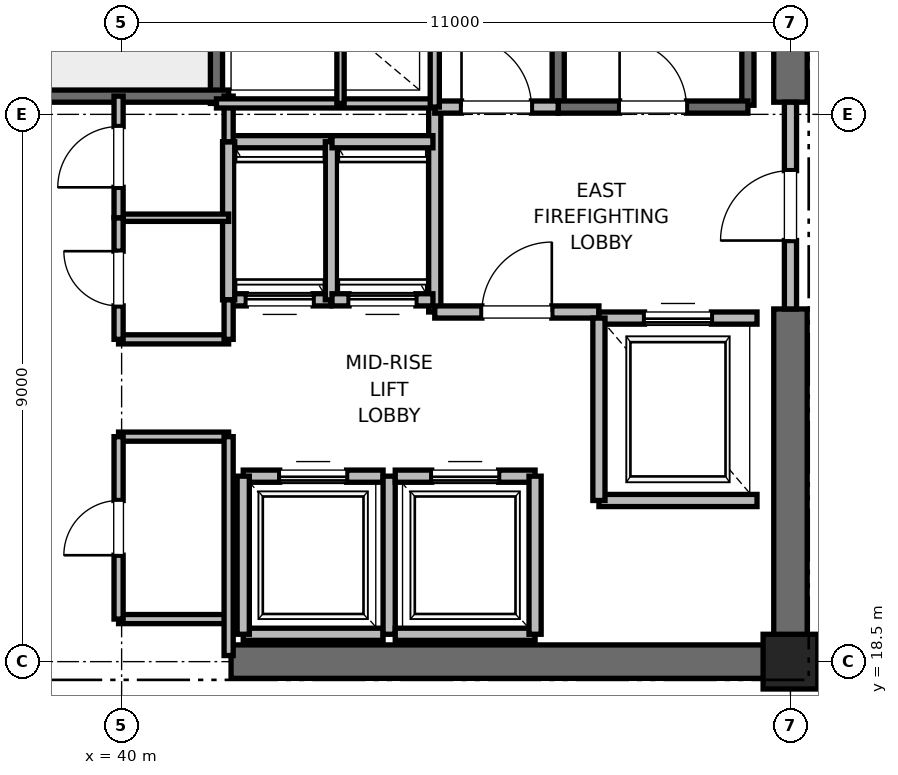
"""IFC4 building model, lengths in metres.
Left out: names, types, materials, properties, quantities, classifications, styles, units other than length and angle.
Written with IfcOpenShell. Run it as: python <this file> out.ifc"""

import sys

from ifc_helpers import new_model, si_unit, direction, frame, frame_2d, origin, origin_2d, place, context, subcontext, project, spatial, rectangle, extrude, element, fill, save


model = new_model("IFC4")
c1 = context("Model", 3, precision=1e-05, world=origin(), true_north=direction((0.0, 1.0)))
c2 = subcontext(c1, "Body", "Model", "MODEL_VIEW")
j1 = project(units=[si_unit("LENGTHUNIT", "METRE"), si_unit("PLANEANGLEUNIT", "RADIAN")], contexts=[c1])
p1 = place(None, origin())
s1 = spatial("IfcSite", under=j1, at=p1, CompositionType="ELEMENT")
p2 = place(p1, origin())
s2 = spatial("IfcBuilding", under=s1, at=p2, CompositionType="ELEMENT")
p3 = place(p2, frame((0.0, 0.0, 209.2)))
s3 = spatial("IfcBuildingStorey", under=s2, at=p3, CompositionType="ELEMENT", Elevation=209.2)
p4 = place(p3, frame((51.0, 18.5, 0.0), z_axis=(0.0, 0.0, 1.0), x_axis=(1.0, 0.0, 0.0)))
e1 = element("IfcColumn", 1, at=p4, inside=s3, PredefinedType="PILASTER", context=c2, shape_type="SweptSolid", body=[
    extrude(rectangle(XDim=0.9, YDim=0.9, at=origin_2d()), origin(), (0.0, 0.0, 1.0), 4.0),
])
p5 = place(p3, frame((41.8, 18.5, 0.0), z_axis=(0.0, 0.0, 1.0), x_axis=(1.0, 0.0, 0.0)))
e2 = element("IfcWall", 2, at=p5, inside=s3, PredefinedType="SHEAR", context=c2, shape_type="SweptSolid", body=[
    extrude(rectangle(XDim=9.2, YDim=0.55, at=frame_2d((4.6, 0.0))), origin(), (0.0, 0.0, 1.0), 3.775),
])
p6 = place(p3, frame((51.0, 18.5, 0.0), z_axis=(0.0, 0.0, 1.0), x_axis=(0.0, 1.0, 0.0)))
e3 = element("IfcWall", 3, at=p6, inside=s3, PredefinedType="SHEAR", context=c2, shape_type="SweptSolid", body=[
    extrude(rectangle(XDim=5.8, YDim=0.55, at=frame_2d((2.9, 0.0))), origin(), (0.0, 0.0, 1.0), 3.775),
])
p7 = place(p3, frame((51.0, 27.7, 0.0), z_axis=(0.0, 0.0, 1.0), x_axis=(0.0, 1.0, 0.0)))
e4 = element("IfcWall", 4, at=p7, inside=s3, PredefinedType="SHEAR", context=c2, shape_type="SweptSolid", body=[
    extrude(rectangle(XDim=8.8, YDim=0.55, at=frame_2d((4.4, 0.0))), origin(), (0.0, 0.0, 1.0), 3.775),
])
p8 = place(p3, frame((50.3, 27.65, 0.0), z_axis=(0.0, 0.0, 1.0), x_axis=(0.0, 1.0, 0.0)))
e5 = element("IfcWall", 5, at=p8, inside=s3, PredefinedType="SOLIDWALL", context=c2, shape_type="SweptSolid", body=[
    extrude(rectangle(XDim=8.15, YDim=0.2, at=frame_2d((4.075, 0.0))), origin(), (0.0, 0.0, 1.0), 3.775),
])
p9 = place(p3, frame((47.18, 27.62, 0.0), z_axis=(0.0, 0.0, 1.0), x_axis=(0.0, 1.0, 0.0)))
e6 = element("IfcWall", 6, at=p9, inside=s3, PredefinedType="SOLIDWALL", context=c2, shape_type="SweptSolid", body=[
    extrude(rectangle(XDim=8.18, YDim=0.2, at=frame_2d((4.09, 0.0))), origin(), (0.0, 0.0, 1.0), 3.775),
])
p10 = place(p3, frame((47.18, 27.62, 0.0), z_axis=(0.0, 0.0, 1.0), x_axis=(1.0, 0.0, 0.0)))
e7 = element("IfcWall", 7, at=p10, inside=s3, PredefinedType="SOLIDWALL", context=c2, shape_type="SweptSolid", body=[
    extrude(rectangle(XDim=3.12, YDim=0.2, at=frame_2d((1.56, 0.0))), origin(), (0.0, 0.0, 1.0), 3.775),
])
p11 = place(p10, frame((1.01, 0.0, 0.0)))
e8 = element("IfcOpeningElement", 8, at=p11, cuts=e7, PredefinedType="OPENING", context=c2, shape_type="SweptSolid", body=[
    extrude(rectangle(XDim=1.1, YDim=2.15, at=frame_2d((0.55, 1.075))), frame((0.0, 0.1, 0.0), z_axis=(0.0, -1.0, 0.0), x_axis=(1.0, 0.0, 0.0)), (0.0, 0.0, 1.0), 0.2),
])
p12 = place(p3, frame((41.56, 27.68, 0.0), z_axis=(0.0, 0.0, 1.0), x_axis=(0.0, 1.0, 0.0)))
e9 = element("IfcWall", 9, at=p12, inside=s3, PredefinedType="SOLIDWALL", context=c2, shape_type="SweptSolid", body=[
    extrude(rectangle(XDim=8.57, YDim=0.2, at=frame_2d((4.285, 0.0))), origin(), (0.0, 0.0, 1.0), 3.775),
])
p13 = place(p3, frame((38.44, 27.8, 0.0), z_axis=(0.0, 0.0, 1.0), x_axis=(1.0, 0.0, 0.0)))
e10 = element("IfcWall", 10, at=p13, inside=s3, PredefinedType="SOLIDWALL", context=c2, shape_type="SweptSolid", body=[
    extrude(rectangle(XDim=3.32, YDim=0.2, at=frame_2d((1.66, 0.0))), origin(), (0.0, 0.0, 1.0), 3.775),
])
p14 = place(p3, frame((45.15, 24.25, 0.0), z_axis=(0.0, 0.0, 1.0), x_axis=(0.0, 1.0, 0.0)))
e11 = element("IfcWall", 11, at=p14, inside=s3, PredefinedType="PARTITIONING", context=c2, shape_type="SweptSolid", body=[
    extrude(rectangle(XDim=3.37, YDim=0.2, at=frame_2d((1.685, 0.0))), origin(), (0.0, 0.0, 1.0), 3.775),
])
p15 = place(p3, frame((45.15, 24.25, 0.0), z_axis=(0.0, 0.0, 1.0), x_axis=(1.0, 0.0, 0.0)))
e12 = element("IfcWall", 12, at=p15, inside=s3, PredefinedType="PARTITIONING", context=c2, shape_type="SweptSolid", body=[
    extrude(rectangle(XDim=2.7, YDim=0.2, at=frame_2d((1.35, 0.0))), origin(), (0.0, 0.0, 1.0), 3.775),
])
p16 = place(p15, frame((0.775, 0.0, 0.0)))
e13 = element("IfcOpeningElement", 13, at=p16, cuts=e12, PredefinedType="OPENING", context=c2, shape_type="SweptSolid", body=[
    extrude(rectangle(XDim=1.15, YDim=2.2, at=frame_2d((0.575, 1.1))), frame((0.0, 0.1, 0.0), z_axis=(0.0, -1.0, 0.0), x_axis=(1.0, 0.0, 0.0)), (0.0, 0.0, 1.0), 0.2),
])
p17 = place(p3, frame((45.15, 27.62, 0.0), z_axis=(0.0, 0.0, 1.0), x_axis=(1.0, 0.0, 0.0)))
e14 = element("IfcWall", 14, at=p17, inside=s3, PredefinedType="PARTITIONING", context=c2, shape_type="SweptSolid", body=[
    extrude(rectangle(XDim=2.03, YDim=0.2, at=frame_2d((1.015, 0.0))), origin(), (0.0, 0.0, 1.0), 3.775),
])
p18 = place(p17, frame((0.44, 0.0, 0.0)))
e15 = element("IfcOpeningElement", 15, at=p18, cuts=e14, PredefinedType="OPENING", context=c2, shape_type="SweptSolid", body=[
    extrude(rectangle(XDim=1.15, YDim=2.2, at=frame_2d((0.575, 1.1))), frame((0.0, 0.1, 0.0), z_axis=(0.0, -1.0, 0.0), x_axis=(1.0, 0.0, 0.0)), (0.0, 0.0, 1.0), 0.2),
])
p19 = place(p3, frame((51.0, 24.3, 0.0), z_axis=(0.0, 0.0, 1.0), x_axis=(0.0, 1.0, 0.0)))
e16 = element("IfcWall", 16, at=p19, inside=s3, PredefinedType="PARTITIONING", context=c2, shape_type="SweptSolid", body=[
    extrude(rectangle(XDim=3.4, YDim=0.2, at=frame_2d((1.7, 0.0))), origin(), (0.0, 0.0, 1.0), 2.755),
])
p20 = place(p19, frame((1.125, 0.0, 0.0)))
e17 = element("IfcOpeningElement", 17, at=p20, cuts=e16, PredefinedType="OPENING", context=c2, shape_type="SweptSolid", body=[
    extrude(rectangle(XDim=1.15, YDim=2.2, at=frame_2d((0.575, 1.1))), frame((0.0, 0.1, 0.0), z_axis=(0.0, -1.0, 0.0), x_axis=(1.0, 0.0, 0.0)), (0.0, 0.0, 1.0), 0.2),
])
p21 = place(p3, frame((47.85, 21.15, 0.0), z_axis=(0.0, 0.0, 1.0), x_axis=(1.0, 0.0, 0.0)))
e18 = element("IfcWall", 18, at=p21, inside=s3, PredefinedType="SOLIDWALL", context=c2, shape_type="SweptSolid", body=[
    extrude(rectangle(XDim=2.6, YDim=0.2, at=frame_2d((1.3, 0.0))), origin(), (0.0, 0.0, 1.0), 3.775),
])
p22 = place(p3, frame((50.45, 24.15, 0.0), z_axis=(0.0, 0.0, 1.0), x_axis=(-1.0, 0.0, 0.0)))
e19 = element("IfcWall", 19, at=p22, inside=s3, PredefinedType="SOLIDWALL", context=c2, shape_type="SweptSolid", body=[
    extrude(rectangle(XDim=2.6, YDim=0.2, at=frame_2d((1.3, 0.0))), origin(), (0.0, 0.0, 1.0), 2.755),
])
p23 = place(p22, frame((0.75, 0.0, 0.0)))
e20 = element("IfcOpeningElement", 20, at=p23, cuts=e19, PredefinedType="OPENING", context=c2, shape_type="SweptSolid", body=[
    extrude(rectangle(XDim=1.1, YDim=2.2, at=frame_2d((0.55, 1.1))), frame((0.0, 0.1, 0.0), z_axis=(0.0, -1.0, 0.0), x_axis=(1.0, 0.0, 0.0)), (0.0, 0.0, 1.0), 0.2),
])
p24 = place(p3, frame((47.85, 24.15, 0.0), z_axis=(0.0, 0.0, 1.0), x_axis=(0.0, -1.0, 0.0)))
e21 = element("IfcWall", 21, at=p24, inside=s3, PredefinedType="SOLIDWALL", context=c2, shape_type="SweptSolid", body=[
    extrude(rectangle(XDim=3.0, YDim=0.2, at=frame_2d((1.5, 0.0))), origin(), (0.0, 0.0, 1.0), 3.775),
])
p25 = place(p3, frame((42.0, 18.95, 0.0), z_axis=(0.0, 0.0, 1.0), x_axis=(1.0, 0.0, 0.0)))
e22 = element("IfcWall", 22, at=p25, inside=s3, PredefinedType="SOLIDWALL", context=c2, shape_type="SweptSolid", body=[
    extrude(rectangle(XDim=2.3, YDim=0.2, at=frame_2d((1.15, 0.0))), origin(), (0.0, 0.0, 1.0), 2.755),
])
p26 = place(p3, frame((44.3, 21.55, 0.0), z_axis=(0.0, 0.0, 1.0), x_axis=(-1.0, 0.0, 0.0)))
e23 = element("IfcWall", 23, at=p26, inside=s3, PredefinedType="SOLIDWALL", context=c2, shape_type="SweptSolid", body=[
    extrude(rectangle(XDim=2.3, YDim=0.2, at=frame_2d((1.15, 0.0))), origin(), (0.0, 0.0, 1.0), 3.775),
])
p27 = place(p26, frame((0.6, 0.0, 0.0)))
e24 = element("IfcOpeningElement", 24, at=p27, cuts=e23, PredefinedType="OPENING", context=c2, shape_type="SweptSolid", body=[
    extrude(rectangle(XDim=1.1, YDim=2.2, at=frame_2d((0.55, 1.1))), frame((0.0, 0.1, 0.0), z_axis=(0.0, -1.0, 0.0), x_axis=(1.0, 0.0, 0.0)), (0.0, 0.0, 1.0), 0.2),
])
p28 = place(p3, frame((42.0, 21.55, 0.0), z_axis=(0.0, 0.0, 1.0), x_axis=(0.0, -1.0, 0.0)))
e25 = element("IfcWall", 25, at=p28, inside=s3, PredefinedType="SOLIDWALL", context=c2, shape_type="SweptSolid", body=[
    extrude(rectangle(XDim=2.6, YDim=0.2, at=frame_2d((1.3, 0.0))), origin(), (0.0, 0.0, 1.0), 2.755),
])
p29 = place(p3, frame((44.4, 18.95, 0.0), z_axis=(0.0, 0.0, 1.0), x_axis=(0.0, 1.0, 0.0)))
e26 = element("IfcWall", 26, at=p29, inside=s3, PredefinedType="SOLIDWALL", context=c2, shape_type="SweptSolid", body=[
    extrude(rectangle(XDim=2.6, YDim=0.2, at=frame_2d((1.3, 0.0))), origin(), (0.0, 0.0, 1.0), 3.775),
])
p30 = place(p3, frame((44.5, 18.95, 0.0), z_axis=(0.0, 0.0, 1.0), x_axis=(1.0, 0.0, 0.0)))
e27 = element("IfcWall", 27, at=p30, inside=s3, PredefinedType="SOLIDWALL", context=c2, shape_type="SweptSolid", body=[
    extrude(rectangle(XDim=2.3, YDim=0.2, at=frame_2d((1.15, 0.0))), origin(), (0.0, 0.0, 1.0), 3.775),
])
p31 = place(p3, frame((46.8, 21.55, 0.0), z_axis=(0.0, 0.0, 1.0), x_axis=(-1.0, 0.0, 0.0)))
e28 = element("IfcWall", 28, at=p31, inside=s3, PredefinedType="SOLIDWALL", context=c2, shape_type="SweptSolid", body=[
    extrude(rectangle(XDim=2.3, YDim=0.2, at=frame_2d((1.15, 0.0))), origin(), (0.0, 0.0, 1.0), 3.775),
])
p32 = place(p31, frame((0.6, 0.0, 0.0)))
e29 = element("IfcOpeningElement", 29, at=p32, cuts=e28, PredefinedType="OPENING", context=c2, shape_type="SweptSolid", body=[
    extrude(rectangle(XDim=1.1, YDim=2.2, at=frame_2d((0.55, 1.1))), frame((0.0, 0.1, 0.0), z_axis=(0.0, -1.0, 0.0), x_axis=(1.0, 0.0, 0.0)), (0.0, 0.0, 1.0), 0.2),
])
p33 = place(p3, frame((46.8, 18.95, 0.0), z_axis=(0.0, 0.0, 1.0), x_axis=(0.0, 1.0, 0.0)))
e30 = element("IfcWall", 30, at=p33, inside=s3, PredefinedType="SOLIDWALL", context=c2, shape_type="SweptSolid", body=[
    extrude(rectangle(XDim=2.6, YDim=0.2, at=frame_2d((1.3, 0.0))), origin(), (0.0, 0.0, 1.0), 3.775),
])
p34 = place(p3, frame((41.76, 24.45, 0.0), z_axis=(0.0, 0.0, 1.0), x_axis=(1.0, 0.0, 0.0)))
e31 = element("IfcWall", 31, at=p34, inside=s3, PredefinedType="SOLIDWALL", context=c2, shape_type="SweptSolid", body=[
    extrude(rectangle(XDim=1.68, YDim=0.2, at=frame_2d((0.84, 0.0))), origin(), (0.0, 0.0, 1.0), 3.775),
])
p35 = place(p34, frame((0.29, 0.0, 0.0)))
e32 = element("IfcOpeningElement", 32, at=p35, cuts=e31, PredefinedType="OPENING", context=c2, shape_type="SweptSolid", body=[
    extrude(rectangle(XDim=1.1, YDim=2.2, at=frame_2d((0.55, 1.1))), frame((0.0, 0.1, 0.0), z_axis=(0.0, -1.0, 0.0), x_axis=(1.0, 0.0, 0.0)), (0.0, 0.0, 1.0), 0.2),
])
p36 = place(p3, frame((43.44, 27.05, 0.0), z_axis=(0.0, 0.0, 1.0), x_axis=(-1.0, 0.0, 0.0)))
e33 = element("IfcWall", 33, at=p36, inside=s3, PredefinedType="SOLIDWALL", context=c2, shape_type="SweptSolid", body=[
    extrude(rectangle(XDim=1.68, YDim=0.2, at=frame_2d((0.84, 0.0))), origin(), (0.0, 0.0, 1.0), 3.775),
])
for number, where, z_axis, x_axis in (
    (34, (41.76, 27.05, 0.0), (0.0, 0.0, 1.0), (0.0, -1.0, 0.0)),
    (35, (43.45, 24.45, 0.0), (0.0, 0.0, 1.0), (0.0, 1.0, 0.0)),
):
    element("IfcWall", number, at=place(p3, frame(where, z_axis=z_axis, x_axis=x_axis)), inside=s3, PredefinedType="SOLIDWALL", context=c2, shape_type="SweptSolid", body=[
        extrude(rectangle(XDim=2.6, YDim=0.2, at=frame_2d((1.3, 0.0))), origin(), (0.0, 0.0, 1.0), 3.775),
    ])
p37 = place(p3, frame((43.46, 24.45, 0.0), z_axis=(0.0, 0.0, 1.0), x_axis=(1.0, 0.0, 0.0)))
e36 = element("IfcWall", 36, at=p37, inside=s3, PredefinedType="SOLIDWALL", context=c2, shape_type="SweptSolid", body=[
    extrude(rectangle(XDim=1.66, YDim=0.2, at=frame_2d((0.83, 0.0))), origin(), (0.0, 0.0, 1.0), 3.775),
])
p38 = place(p37, frame((0.28, 0.0, 0.0)))
e37 = element("IfcOpeningElement", 37, at=p38, cuts=e36, PredefinedType="OPENING", context=c2, shape_type="SweptSolid", body=[
    extrude(rectangle(XDim=1.1, YDim=2.2, at=frame_2d((0.55, 1.1))), frame((0.0, 0.1, 0.0), z_axis=(0.0, -1.0, 0.0), x_axis=(1.0, 0.0, 0.0)), (0.0, 0.0, 1.0), 0.2),
])
p39 = place(p3, frame((45.12, 27.05, 0.0), z_axis=(0.0, 0.0, 1.0), x_axis=(-1.0, 0.0, 0.0)))
e38 = element("IfcWall", 38, at=p39, inside=s3, PredefinedType="SOLIDWALL", context=c2, shape_type="SweptSolid", body=[
    extrude(rectangle(XDim=1.66, YDim=0.2, at=frame_2d((0.83, 0.0))), origin(), (0.0, 0.0, 1.0), 3.775),
])
for number, where, z_axis, x_axis in (
    (39, (39.95, 19.2, 0.0), (0.0, 0.0, 1.0), (1.0, 0.0, 0.0)),
    (40, (39.95, 22.2, 0.0), (0.0, 0.0, 1.0), (1.0, 0.0, 0.0)),
    (41, (39.95, 23.8, 0.0), (0.0, 0.0, 1.0), (1.0, 0.0, 0.0)),
):
    element("IfcWall", number, at=place(p3, frame(where, z_axis=z_axis, x_axis=x_axis)), inside=s3, PredefinedType="PARTITIONING", context=c2, shape_type="SweptSolid", body=[
        extrude(rectangle(XDim=1.81, YDim=0.15, at=frame_2d((0.905, 0.0))), origin(), (0.0, 0.0, 1.0), 2.85),
    ])
p40 = place(p3, frame((39.95, 25.8, 0.0), z_axis=(0.0, 0.0, 1.0), x_axis=(1.0, 0.0, 0.0)))
e42 = element("IfcWall", 42, at=p40, inside=s3, PredefinedType="PARTITIONING", context=c2, shape_type="SweptSolid", body=[
    extrude(rectangle(XDim=1.81, YDim=0.12, at=frame_2d((0.905, 0.0))), origin(), (0.0, 0.0, 1.0), 2.85),
])
p41 = place(p3, frame((41.76, 18.6, 0.0), z_axis=(0.0, 0.0, 1.0), x_axis=(0.0, 1.0, 0.0)))
e43 = element("IfcWall", 43, at=p41, inside=s3, PredefinedType="PARTITIONING", context=c2, shape_type="SweptSolid", body=[
    extrude(rectangle(XDim=3.6, YDim=0.15, at=frame_2d((1.8, 0.0))), origin(), (0.0, 0.0, 1.0), 2.755),
])
p42 = place(p3, frame((41.76, 23.8, 0.0), z_axis=(0.0, 0.0, 1.0), x_axis=(0.0, 1.0, 0.0)))
e44 = element("IfcWall", 44, at=p42, inside=s3, PredefinedType="PARTITIONING", context=c2, shape_type="SweptSolid", body=[
    extrude(rectangle(XDim=0.65, YDim=0.15, at=frame_2d((0.325, 0.0))), origin(), (0.0, 0.0, 1.0), 2.85),
])
p43 = place(p3, frame((41.76, 27.05, 0.0), z_axis=(0.0, 0.0, 1.0), x_axis=(0.0, 1.0, 0.0)))
e45 = element("IfcWall", 45, at=p43, inside=s3, PredefinedType="PARTITIONING", context=c2, shape_type="SweptSolid", body=[
    extrude(rectangle(XDim=0.75, YDim=0.15, at=frame_2d((0.375, 0.0))), origin(), (0.0, 0.0, 1.0), 2.85),
])
p44 = place(p3, frame((39.95, 19.2, 0.0), z_axis=(0.0, 0.0, 1.0), x_axis=(0.0, 1.0, 0.0)))
e46 = element("IfcWall", 46, at=p44, inside=s3, PredefinedType="PARTITIONING", context=c2, shape_type="SweptSolid", body=[
    extrude(rectangle(XDim=3.0, YDim=0.15, at=frame_2d((1.5, 0.0))), origin(), (0.0, 0.0, 1.0), 2.85),
])
p45 = place(p44, frame((1.05, 0.0, 0.0)))
e47 = element("IfcOpeningElement", 47, at=p45, cuts=e46, PredefinedType="OPENING", context=c2, shape_type="SweptSolid", body=[
    extrude(rectangle(XDim=0.9, YDim=2.1, at=frame_2d((0.45, 1.05))), frame((0.0, 0.075, 0.0), z_axis=(0.0, -1.0, 0.0), x_axis=(1.0, 0.0, 0.0)), (0.0, 0.0, 1.0), 0.15),
])
p46 = place(p3, frame((39.95, 23.8, 0.0), z_axis=(0.0, 0.0, 1.0), x_axis=(0.0, 1.0, 0.0)))
e48 = element("IfcWall", 48, at=p46, inside=s3, PredefinedType="PARTITIONING", context=c2, shape_type="SweptSolid", body=[
    extrude(rectangle(XDim=2.0, YDim=0.15, at=frame_2d((1.0, 0.0))), origin(), (0.0, 0.0, 1.0), 2.85),
])
p47 = place(p46, frame((0.55, 0.0, 0.0)))
e49 = element("IfcOpeningElement", 49, at=p47, cuts=e48, PredefinedType="OPENING", context=c2, shape_type="SweptSolid", body=[
    extrude(rectangle(XDim=0.9, YDim=2.1, at=frame_2d((0.45, 1.05))), frame((0.0, 0.075, 0.0), z_axis=(0.0, -1.0, 0.0), x_axis=(1.0, 0.0, 0.0)), (0.0, 0.0, 1.0), 0.15),
])
p48 = place(p3, frame((39.95, 25.8, 0.0), z_axis=(0.0, 0.0, 1.0), x_axis=(0.0, 1.0, 0.0)))
e50 = element("IfcWall", 50, at=p48, inside=s3, PredefinedType="PARTITIONING", context=c2, shape_type="SweptSolid", body=[
    extrude(rectangle(XDim=2.0, YDim=0.15, at=frame_2d((1.0, 0.0))), origin(), (0.0, 0.0, 1.0), 2.85),
])
p49 = place(p48, frame((0.5, 0.0, 0.0)))
e51 = element("IfcOpeningElement", 51, at=p49, cuts=e50, PredefinedType="OPENING", context=c2, shape_type="SweptSolid", body=[
    extrude(rectangle(XDim=1.0, YDim=2.15, at=frame_2d((0.5, 1.075))), frame((0.0, 0.075, 0.0), z_axis=(0.0, -1.0, 0.0), x_axis=(1.0, 0.0, 0.0)), (0.0, 0.0, 1.0), 0.15),
])
p50 = place(p3, frame((41.56, 27.68, 0.0), z_axis=(0.0, 0.0, 1.0), x_axis=(1.0, 0.0, 0.0)))
e52 = element("IfcWall", 52, at=p50, inside=s3, PredefinedType="PARTITIONING", context=c2, shape_type="SweptSolid", body=[
    extrude(rectangle(XDim=3.59, YDim=0.15, at=frame_2d((1.795, 0.0))), origin(), (0.0, 0.0, 1.0), 2.85),
])
p51 = place(p3, frame((45.15, 27.62, 0.0), z_axis=(0.0, 0.0, 1.0), x_axis=(0.0, 1.0, 0.0)))
e53 = element("IfcWall", 53, at=p51, inside=s3, PredefinedType="PARTITIONING", context=c2, shape_type="SweptSolid", body=[
    extrude(rectangle(XDim=3.1, YDim=0.15, at=frame_2d((1.55, 0.0))), origin(), (0.0, 0.0, 1.0), 2.85),
])
p52 = place(p3, frame((43.6, 27.68, 0.0), z_axis=(0.0, 0.0, 1.0), x_axis=(0.0, 1.0, 0.0)))
e54 = element("IfcWall", 54, at=p52, inside=s3, PredefinedType="PARTITIONING", context=c2, shape_type="SweptSolid", body=[
    extrude(rectangle(XDim=3.04, YDim=0.12, at=frame_2d((1.52, 0.0))), origin(), (0.0, 0.0, 1.0), 2.85),
])
p53 = place(p11, origin())
e55 = element("IfcDoor", 55, at=p53, inside=s3, OperationType="SINGLE_SWING_LEFT", PredefinedType="DOOR", context=c2, shape_type="SweptSolid", body=[
    extrude(rectangle(XDim=1.1, YDim=2.15, at=frame_2d((0.55, 1.075))), frame((0.0, 0.025, 0.0), z_axis=(0.0, -1.0, 0.0), x_axis=(1.0, 0.0, 0.0)), (0.0, 0.0, 1.0), 0.05),
])
fill(e8, e55)
p54 = place(p16, origin())
e56 = element("IfcDoor", 56, at=p54, inside=s3, OperationType="SINGLE_SWING_RIGHT", PredefinedType="DOOR", context=c2, shape_type="SweptSolid", body=[
    extrude(rectangle(XDim=1.15, YDim=2.2, at=frame_2d((0.575, 1.1))), frame((0.0, 0.025, 0.0), z_axis=(0.0, -1.0, 0.0), x_axis=(1.0, 0.0, 0.0)), (0.0, 0.0, 1.0), 0.05),
])
fill(e13, e56)
p55 = place(p18, origin())
e57 = element("IfcDoor", 57, at=p55, inside=s3, OperationType="SINGLE_SWING_LEFT", PredefinedType="DOOR", context=c2, shape_type="SweptSolid", body=[
    extrude(rectangle(XDim=1.15, YDim=2.2, at=frame_2d((0.575, 1.1))), frame((0.0, 0.025, 0.0), z_axis=(0.0, -1.0, 0.0), x_axis=(1.0, 0.0, 0.0)), (0.0, 0.0, 1.0), 0.05),
])
fill(e15, e57)
p56 = place(p20, origin())
e58 = element("IfcDoor", 58, at=p56, inside=s3, OperationType="SINGLE_SWING_LEFT", PredefinedType="DOOR", context=c2, shape_type="SweptSolid", body=[
    extrude(rectangle(XDim=1.15, YDim=2.2, at=frame_2d((0.575, 1.1))), frame((0.0, 0.025, 0.0), z_axis=(0.0, -1.0, 0.0), x_axis=(1.0, 0.0, 0.0)), (0.0, 0.0, 1.0), 0.05),
])
fill(e17, e58)
p57 = place(p23, origin())
e59 = element("IfcDoor", 59, at=p57, inside=s3, OperationType="SLIDING_TO_RIGHT", PredefinedType="DOOR", context=c2, shape_type="SweptSolid", body=[
    extrude(rectangle(XDim=1.1, YDim=2.2, at=frame_2d((0.55, 1.1))), frame((0.0, 0.025, 0.0), z_axis=(0.0, -1.0, 0.0), x_axis=(1.0, 0.0, 0.0)), (0.0, 0.0, 1.0), 0.05),
])
fill(e20, e59)
p58 = place(p27, origin())
e60 = element("IfcDoor", 60, at=p58, inside=s3, OperationType="SLIDING_TO_RIGHT", PredefinedType="DOOR", context=c2, shape_type="SweptSolid", body=[
    extrude(rectangle(XDim=1.1, YDim=2.2, at=frame_2d((0.55, 1.1))), frame((0.0, 0.025, 0.0), z_axis=(0.0, -1.0, 0.0), x_axis=(1.0, 0.0, 0.0)), (0.0, 0.0, 1.0), 0.05),
])
fill(e24, e60)
p59 = place(p32, origin())
e61 = element("IfcDoor", 61, at=p59, inside=s3, OperationType="SLIDING_TO_RIGHT", PredefinedType="DOOR", context=c2, shape_type="SweptSolid", body=[
    extrude(rectangle(XDim=1.1, YDim=2.2, at=frame_2d((0.55, 1.1))), frame((0.0, 0.025, 0.0), z_axis=(0.0, -1.0, 0.0), x_axis=(1.0, 0.0, 0.0)), (0.0, 0.0, 1.0), 0.05),
])
fill(e29, e61)
p60 = place(p35, origin())
e62 = element("IfcDoor", 62, at=p60, inside=s3, OperationType="SLIDING_TO_RIGHT", PredefinedType="DOOR", context=c2, shape_type="SweptSolid", body=[
    extrude(rectangle(XDim=1.1, YDim=2.2, at=frame_2d((0.55, 1.1))), frame((0.0, 0.025, 0.0), z_axis=(0.0, -1.0, 0.0), x_axis=(1.0, 0.0, 0.0)), (0.0, 0.0, 1.0), 0.05),
])
fill(e32, e62)
p61 = place(p38, origin())
e63 = element("IfcDoor", 63, at=p61, inside=s3, OperationType="SLIDING_TO_RIGHT", PredefinedType="DOOR", context=c2, shape_type="SweptSolid", body=[
    extrude(rectangle(XDim=1.1, YDim=2.2, at=frame_2d((0.55, 1.1))), frame((0.0, 0.025, 0.0), z_axis=(0.0, -1.0, 0.0), x_axis=(1.0, 0.0, 0.0)), (0.0, 0.0, 1.0), 0.05),
])
fill(e37, e63)
p62 = place(p45, origin())
e64 = element("IfcDoor", 64, at=p62, inside=s3, OperationType="SINGLE_SWING_LEFT", PredefinedType="DOOR", context=c2, shape_type="SweptSolid", body=[
    extrude(rectangle(XDim=0.9, YDim=2.1, at=frame_2d((0.45, 1.05))), frame((0.0, 0.025, 0.0), z_axis=(0.0, -1.0, 0.0), x_axis=(1.0, 0.0, 0.0)), (0.0, 0.0, 1.0), 0.05),
])
fill(e47, e64)
p63 = place(p47, origin())
e65 = element("IfcDoor", 65, at=p63, inside=s3, OperationType="SINGLE_SWING_RIGHT", PredefinedType="DOOR", context=c2, shape_type="SweptSolid", body=[
    extrude(rectangle(XDim=0.9, YDim=2.1, at=frame_2d((0.45, 1.05))), frame((0.0, 0.025, 0.0), z_axis=(0.0, -1.0, 0.0), x_axis=(1.0, 0.0, 0.0)), (0.0, 0.0, 1.0), 0.05),
])
fill(e49, e65)
p64 = place(p49, origin())
e66 = element("IfcDoor", 66, at=p64, inside=s3, OperationType="SINGLE_SWING_LEFT", PredefinedType="DOOR", context=c2, shape_type="SweptSolid", body=[
    extrude(rectangle(XDim=1.0, YDim=2.15, at=frame_2d((0.5, 1.075))), frame((0.0, 0.025, 0.0), z_axis=(0.0, -1.0, 0.0), x_axis=(1.0, 0.0, 0.0)), (0.0, 0.0, 1.0), 0.05),
])
fill(e51, e66)
save(model, sys.argv[1])
